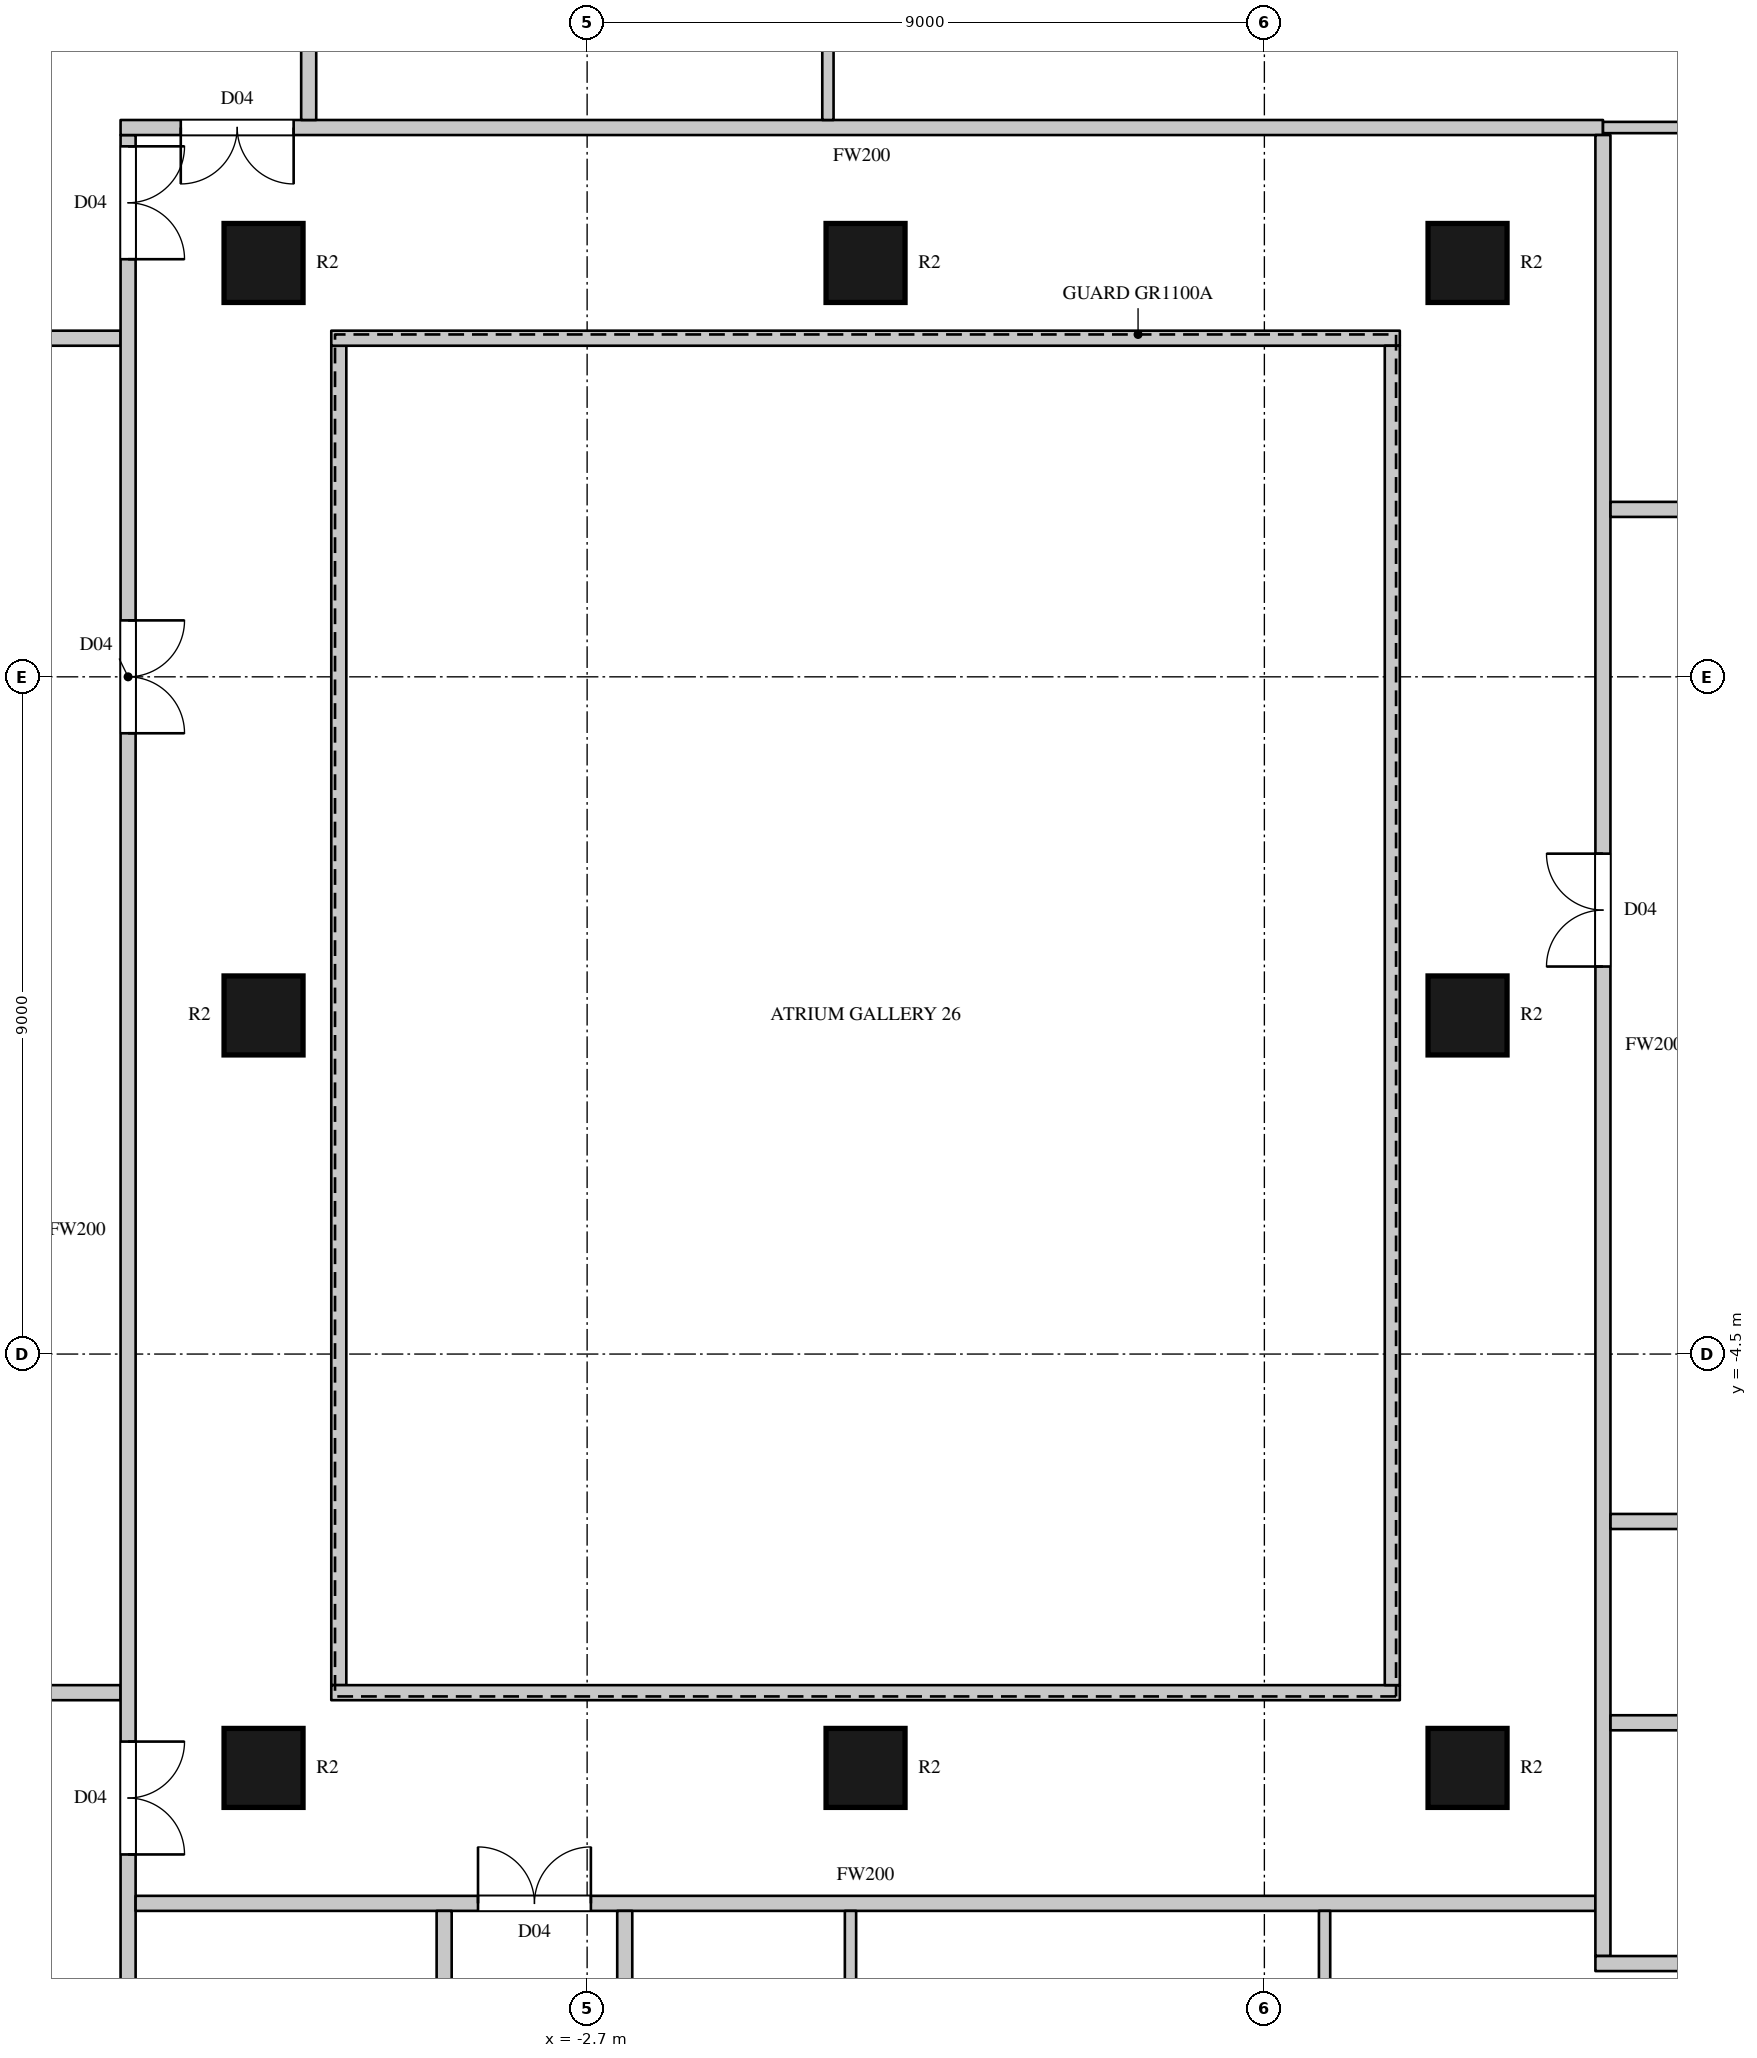
"""IFC4 building model, lengths in metres.
Left out: names, types, materials, properties, quantities, classifications, styles, units other than length and angle.
Written with IfcOpenShell. Run it as: python <this file> out.ifc"""

import sys

from ifc_helpers import new_model, si_unit, direction, frame, frame_2d, origin, origin_2d, place, context, subcontext, project, spatial, rectangle, circle, extrude, element, fill, save


model = new_model("IFC4")
c1 = context("Model", 3, precision=1e-05, world=origin(), true_north=direction((0.0, 1.0)))
c2 = subcontext(c1, "Body", "Model", "MODEL_VIEW")
j1 = project(units=[si_unit("LENGTHUNIT", "METRE"), si_unit("PLANEANGLEUNIT", "RADIAN")], contexts=[c1])
p1 = place(None, origin())
s1 = spatial("IfcSite", under=j1, at=p1, CompositionType="ELEMENT")
p2 = place(p1, origin())
s2 = spatial("IfcBuilding", under=s1, at=p2, CompositionType="ELEMENT")
p3 = place(p2, frame((0.0, 0.0, 123.9)))
s3 = spatial("IfcBuildingStorey", under=s2, at=p3, CompositionType="ELEMENT", Elevation=123.9)
for number, where, z_axis, x_axis in (
    (1, (-7.0, -10.0, 0.0), (0.0, 0.0, 1.0), (1.0, 0.0, 0.0)),
    (2, (-7.0, 0.0, 0.0), (0.0, 0.0, 1.0), (1.0, 0.0, 0.0)),
    (3, (-7.0, 10.0, 0.0), (0.0, 0.0, 1.0), (1.0, 0.0, 0.0)),
    (4, (1.0, -10.0, 0.0), (0.0, 0.0, 1.0), (1.0, 0.0, 0.0)),
    (5, (1.0, 10.0, 0.0), (0.0, 0.0, 1.0), (1.0, 0.0, 0.0)),
    (6, (9.0, -10.0, 0.0), (0.0, 0.0, 1.0), (1.0, 0.0, 0.0)),
    (7, (9.0, 0.0, 0.0), (0.0, 0.0, 1.0), (1.0, 0.0, 0.0)),
    (8, (9.0, 10.0, 0.0), (0.0, 0.0, 1.0), (1.0, 0.0, 0.0)),
):
    element("IfcColumn", number, at=place(p3, frame(where, z_axis=z_axis, x_axis=x_axis)), inside=s3, PredefinedType="COLUMN", context=c2, shape_type="SweptSolid", body=[
        extrude(circle(Radius=0.525, at=origin_2d()), origin(), (0.0, 0.0, 1.0), 3.6),
    ])
p4 = place(p3, frame((-13.97, -9.0, 0.0), z_axis=(0.0, 0.0, 1.0), x_axis=(1.0, 0.0, 0.0)))
e9 = element("IfcWall", 9, at=p4, inside=s3, PredefinedType="PARTITIONING", context=c2, shape_type="SweptSolid", body=[
    extrude(rectangle(XDim=5.07, YDim=0.2, at=frame_2d((2.535, 0.0))), origin(), (0.0, 0.0, 1.0), 3.3),
])
p5 = place(p4, frame((0.4, 0.0, 0.0)))
e10 = element("IfcOpeningElement", 10, at=p5, cuts=e9, PredefinedType="OPENING", context=c2, shape_type="SweptSolid", body=[
    extrude(rectangle(XDim=1.5, YDim=2.2, at=frame_2d((0.75, 1.1))), frame((0.0, 0.11, 0.0), z_axis=(0.0, -1.0, 0.0), x_axis=(1.0, 0.0, 0.0)), (0.0, 0.0, 1.0), 0.22),
])
p6 = place(p4, frame((2.05, 0.0, 0.0)))
e11 = element("IfcOpeningElement", 11, at=p6, cuts=e9, PredefinedType="OPENING", context=c2, shape_type="SweptSolid", body=[
    extrude(rectangle(XDim=1.5, YDim=2.2, at=frame_2d((0.75, 1.1))), frame((0.0, 0.11, 0.0), z_axis=(0.0, -1.0, 0.0), x_axis=(1.0, 0.0, 0.0)), (0.0, 0.0, 1.0), 0.22),
])
p7 = place(p3, frame((-13.97, 9.0, 0.0), z_axis=(0.0, 0.0, 1.0), x_axis=(1.0, 0.0, 0.0)))
e12 = element("IfcWall", 12, at=p7, inside=s3, PredefinedType="PARTITIONING", context=c2, shape_type="SweptSolid", body=[
    extrude(rectangle(XDim=5.07, YDim=0.2, at=frame_2d((2.535, 0.0))), origin(), (0.0, 0.0, 1.0), 3.3),
])
p8 = place(p3, frame((-8.8, -17.4, 0.0), z_axis=(0.0, 0.0, 1.0), x_axis=(0.0, 1.0, 0.0)))
e13 = element("IfcWall", 13, at=p8, inside=s3, PredefinedType="PARTITIONING", context=c2, shape_type="SweptSolid", body=[
    extrude(rectangle(XDim=29.1, YDim=0.2, at=frame_2d((14.55, 0.0))), origin(), (0.0, 0.0, 1.0), 3.3),
])
p9 = place(p8, frame((21.15, 0.0, 0.0)))
e14 = element("IfcOpeningElement", 14, at=p9, cuts=e13, PredefinedType="OPENING", context=c2, shape_type="SweptSolid", body=[
    extrude(rectangle(XDim=1.5, YDim=2.2, at=frame_2d((0.75, 1.1))), frame((0.0, 0.11, 0.0), z_axis=(0.0, -1.0, 0.0), x_axis=(1.0, 0.0, 0.0)), (0.0, 0.0, 1.0), 0.22),
])
p10 = place(p8, frame((6.25, 0.0, 0.0)))
e15 = element("IfcOpeningElement", 15, at=p10, cuts=e13, PredefinedType="OPENING", context=c2, shape_type="SweptSolid", body=[
    extrude(rectangle(XDim=1.5, YDim=2.2, at=frame_2d((0.75, 1.1))), frame((0.0, 0.11, 0.0), z_axis=(0.0, -1.0, 0.0), x_axis=(1.0, 0.0, 0.0)), (0.0, 0.0, 1.0), 0.22),
])
p11 = place(p8, frame((27.45, 0.0, 0.0)))
e16 = element("IfcOpeningElement", 16, at=p11, cuts=e13, PredefinedType="OPENING", context=c2, shape_type="SweptSolid", body=[
    extrude(rectangle(XDim=1.5, YDim=2.2, at=frame_2d((0.75, 1.1))), frame((0.0, 0.11, 0.0), z_axis=(0.0, -1.0, 0.0), x_axis=(1.0, 0.0, 0.0)), (0.0, 0.0, 1.0), 0.22),
])
p12 = place(p8, frame((0.15, 0.0, 0.0)))
e17 = element("IfcOpeningElement", 17, at=p12, cuts=e13, PredefinedType="OPENING", context=c2, shape_type="SweptSolid", body=[
    extrude(rectangle(XDim=0.9, YDim=2.2, at=frame_2d((0.45, 1.1))), frame((0.0, 0.11, 0.0), z_axis=(0.0, -1.0, 0.0), x_axis=(1.0, 0.0, 0.0)), (0.0, 0.0, 1.0), 0.22),
])
p13 = place(p3, frame((-8.7, -11.8, 0.0), z_axis=(0.0, 0.0, 1.0), x_axis=(1.0, 0.0, 0.0)))
e18 = element("IfcWall", 18, at=p13, inside=s3, PredefinedType="PARTITIONING", context=c2, shape_type="SweptSolid", body=[
    extrude(rectangle(XDim=19.4, YDim=0.2, at=frame_2d((9.7, 0.0))), origin(), (0.0, 0.0, 1.0), 3.3),
])
p14 = place(p13, frame((4.55, 0.0, 0.0)))
e19 = element("IfcOpeningElement", 19, at=p14, cuts=e18, PredefinedType="OPENING", context=c2, shape_type="SweptSolid", body=[
    extrude(rectangle(XDim=1.5, YDim=2.2, at=frame_2d((0.75, 1.1))), frame((0.0, 0.11, 0.0), z_axis=(0.0, -1.0, 0.0), x_axis=(1.0, 0.0, 0.0)), (0.0, 0.0, 1.0), 0.22),
])
p15 = place(p3, frame((-8.9, 11.8, 0.0), z_axis=(0.0, 0.0, 1.0), x_axis=(1.0, 0.0, 0.0)))
e20 = element("IfcWall", 20, at=p15, inside=s3, PredefinedType="PARTITIONING", context=c2, shape_type="SweptSolid", body=[
    extrude(rectangle(XDim=19.7, YDim=0.2, at=frame_2d((9.85, 0.0))), origin(), (0.0, 0.0, 1.0), 3.3),
])
p16 = place(p15, frame((0.8, 0.0, 0.0)))
e21 = element("IfcOpeningElement", 21, at=p16, cuts=e20, PredefinedType="OPENING", context=c2, shape_type="SweptSolid", body=[
    extrude(rectangle(XDim=1.5, YDim=2.2, at=frame_2d((0.75, 1.1))), frame((0.0, 0.11, 0.0), z_axis=(0.0, -1.0, 0.0), x_axis=(1.0, 0.0, 0.0)), (0.0, 0.0, 1.0), 0.22),
])
p17 = place(p3, frame((-6.4, 11.9, 0.0), z_axis=(0.0, 0.0, 1.0), x_axis=(0.0, 1.0, 0.0)))
e22 = element("IfcWall", 22, at=p17, inside=s3, PredefinedType="PARTITIONING", context=c2, shape_type="SweptSolid", body=[
    extrude(rectangle(XDim=5.5, YDim=0.2, at=frame_2d((2.75, 0.0))), origin(), (0.0, 0.0, 1.0), 3.3),
])
p18 = place(p17, frame((3.75, 0.0, 0.0)))
e23 = element("IfcOpeningElement", 23, at=p18, cuts=e22, PredefinedType="OPENING", context=c2, shape_type="SweptSolid", body=[
    extrude(rectangle(XDim=1.6, YDim=2.4, at=frame_2d((0.8, 1.2))), frame((0.0, 0.11, 0.0), z_axis=(0.0, -1.0, 0.0), x_axis=(1.0, 0.0, 0.0)), (0.0, 0.0, 1.0), 0.22),
])
p19 = place(p3, frame((-6.0, -8.9, 0.0), z_axis=(0.0, 0.0, 1.0), x_axis=(0.0, 1.0, 0.0)))
e24 = element("IfcWall", 24, at=p19, inside=s3, PredefinedType="PARTITIONING", context=c2, shape_type="SweptSolid", body=[
    extrude(rectangle(XDim=17.8, YDim=0.2, at=frame_2d((8.9, 0.0))), origin(), (0.0, 0.0, 1.0), 3.3),
])
for number, where, z_axis, x_axis in (
    (25, (-6.1, -9.0, 0.0), (0.0, 0.0, 1.0), (1.0, 0.0, 0.0)),
    (26, (-6.1, 9.0, 0.0), (0.0, 0.0, 1.0), (1.0, 0.0, 0.0)),
):
    element("IfcWall", number, at=place(p3, frame(where, z_axis=z_axis, x_axis=x_axis)), inside=s3, PredefinedType="PARTITIONING", context=c2, shape_type="SweptSolid", body=[
        extrude(rectangle(XDim=14.2, YDim=0.2, at=frame_2d((7.1, 0.0))), origin(), (0.0, 0.0, 1.0), 3.3),
    ])
p20 = place(p3, frame((-4.6, -17.4, 0.0), z_axis=(0.0, 0.0, 1.0), x_axis=(0.0, 1.0, 0.0)))
e27 = element("IfcWall", 27, at=p20, inside=s3, PredefinedType="PARTITIONING", context=c2, shape_type="SweptSolid", body=[
    extrude(rectangle(XDim=5.5, YDim=0.2, at=frame_2d((2.75, 0.0))), origin(), (0.0, 0.0, 1.0), 3.3),
])
p21 = place(p3, frame((-2.2, -17.178, 0.0), z_axis=(0.0, 0.0, 1.0), x_axis=(0.0, 1.0, 0.0)))
e28 = element("IfcWall", 28, at=p21, inside=s3, PredefinedType="PARTITIONING", context=c2, shape_type="SweptSolid", body=[
    extrude(rectangle(XDim=5.279, YDim=0.2, at=frame_2d((2.639, 0.0))), origin(), (0.0, 0.0, 1.0), 3.3),
])
p22 = place(p21, frame((0.35, 0.0, 0.0)))
e29 = element("IfcOpeningElement", 29, at=p22, cuts=e28, PredefinedType="OPENING", context=c2, shape_type="SweptSolid", body=[
    extrude(rectangle(XDim=0.9, YDim=2.2, at=frame_2d((0.45, 1.1))), frame((0.0, 0.11, 0.0), z_axis=(0.0, -1.0, 0.0), x_axis=(1.0, 0.0, 0.0)), (0.0, 0.0, 1.0), 0.22),
])
p23 = place(p3, frame((8.0, -8.9, 0.0), z_axis=(0.0, 0.0, 1.0), x_axis=(0.0, 1.0, 0.0)))
e30 = element("IfcWall", 30, at=p23, inside=s3, PredefinedType="PARTITIONING", context=c2, shape_type="SweptSolid", body=[
    extrude(rectangle(XDim=17.8, YDim=0.2, at=frame_2d((8.9, 0.0))), origin(), (0.0, 0.0, 1.0), 3.3),
])
p24 = place(p3, frame((10.799, -12.5, 0.0), z_axis=(0.0, 0.0, 1.0), x_axis=(0.0, 1.0, 0.0)))
e31 = element("IfcWall", 31, at=p24, inside=s3, PredefinedType="PARTITIONING", context=c2, shape_type="SweptSolid", body=[
    extrude(rectangle(XDim=24.2, YDim=0.2, at=frame_2d((12.1, 0.0))), origin(), (0.0, 0.0, 1.0), 3.3),
])
p25 = place(p24, frame((13.15, 0.0, 0.0)))
e32 = element("IfcOpeningElement", 32, at=p25, cuts=e31, PredefinedType="OPENING", context=c2, shape_type="SweptSolid", body=[
    extrude(rectangle(XDim=1.5, YDim=2.2, at=frame_2d((0.75, 1.1))), frame((0.0, 0.11, 0.0), z_axis=(0.0, -1.0, 0.0), x_axis=(1.0, 0.0, 0.0)), (0.0, 0.0, 1.0), 0.22),
])
p26 = place(p3, frame((10.699, -12.6, 0.0), z_axis=(0.0, 0.0, 1.0), x_axis=(1.0, 0.0, 0.0)))
e33 = element("IfcWall", 33, at=p26, inside=s3, PredefinedType="PARTITIONING", context=c2, shape_type="SweptSolid", body=[
    extrude(rectangle(XDim=5.501, YDim=0.2, at=frame_2d((2.75, 0.0))), origin(), (0.0, 0.0, 1.0), 3.3),
])
p27 = place(p3, frame((10.9, -9.4, 0.0), z_axis=(0.0, 0.0, 1.0), x_axis=(1.0, 0.0, 0.0)))
e34 = element("IfcWall", 34, at=p27, inside=s3, PredefinedType="PARTITIONING", context=c2, shape_type="SweptSolid", body=[
    extrude(rectangle(XDim=5.3, YDim=0.2, at=frame_2d((2.65, 0.0))), origin(), (0.0, 0.0, 1.0), 3.3),
])
p28 = place(p27, frame((4.05, 0.0, 0.0)))
e35 = element("IfcOpeningElement", 35, at=p28, cuts=e34, PredefinedType="OPENING", context=c2, shape_type="SweptSolid", body=[
    extrude(rectangle(XDim=0.95, YDim=2.2, at=frame_2d((0.475, 1.1))), frame((0.0, 0.11, 0.0), z_axis=(0.0, -1.0, 0.0), x_axis=(1.0, 0.0, 0.0)), (0.0, 0.0, 1.0), 0.22),
])
p29 = place(p3, frame((10.9, -6.725, 0.0), z_axis=(0.0, 0.0, 1.0), x_axis=(1.0, 0.0, 0.0)))
e36 = element("IfcWall", 36, at=p29, inside=s3, PredefinedType="PARTITIONING", context=c2, shape_type="SweptSolid", body=[
    extrude(rectangle(XDim=5.3, YDim=0.2, at=frame_2d((2.65, 0.0))), origin(), (0.0, 0.0, 1.0), 3.3),
])
p30 = place(p3, frame((10.9, 6.725, 0.0), z_axis=(0.0, 0.0, 1.0), x_axis=(1.0, 0.0, 0.0)))
e37 = element("IfcWall", 37, at=p30, inside=s3, PredefinedType="PARTITIONING", context=c2, shape_type="SweptSolid", body=[
    extrude(rectangle(XDim=5.3, YDim=0.2, at=frame_2d((2.65, 0.0))), origin(), (0.0, 0.0, 1.0), 3.3),
])
p31 = place(p30, frame((4.1, 0.0, 0.0)))
e38 = element("IfcOpeningElement", 38, at=p31, cuts=e37, PredefinedType="OPENING", context=c2, shape_type="SweptSolid", body=[
    extrude(rectangle(XDim=0.9, YDim=2.2, at=frame_2d((0.45, 1.1))), frame((0.0, 0.11, 0.0), z_axis=(0.0, -1.0, 0.0), x_axis=(1.0, 0.0, 0.0)), (0.0, 0.0, 1.0), 0.22),
])
for number, where, z_axis, x_axis in (
    (39, (0.5, 11.9, 0.0), (0.0, 0.0, 1.0), (0.0, 1.0, 0.0)),
    (40, (0.8, -17.4, 0.0), (0.0, 0.0, 1.0), (0.0, 1.0, 0.0)),
    (41, (7.1, -17.4, 0.0), (0.0, 0.0, 1.0), (0.0, 1.0, 0.0)),
):
    element("IfcWall", number, at=place(p3, frame(where, z_axis=z_axis, x_axis=x_axis)), inside=s3, PredefinedType="PARTITIONING", context=c2, shape_type="SweptSolid", body=[
        extrude(rectangle(XDim=5.5, YDim=0.15, at=frame_2d((2.75, 0.0))), origin(), (0.0, 0.0, 1.0), 3.3),
    ])
p32 = place(p3, frame((10.8, 11.8, 0.0), z_axis=(0.0, 0.0, 1.0), x_axis=(1.0, 0.0, 0.0)))
e42 = element("IfcWall", 42, at=p32, inside=s3, PredefinedType="PARTITIONING", context=c2, shape_type="SweptSolid", body=[
    extrude(rectangle(XDim=5.2, YDim=0.15, at=frame_2d((2.6, 0.0))), origin(), (0.0, 0.0, 1.0), 3.3),
])
p33 = place(p9, origin())
e43 = element("IfcDoor", 43, at=p33, inside=s3, OperationType="DOUBLE_DOOR_SINGLE_SWING", PredefinedType="DOOR", context=c2, shape_type="SweptSolid", body=[
    extrude(rectangle(XDim=1.5, YDim=2.2, at=frame_2d((0.75, 1.1))), frame((0.0, 0.025, 0.0), z_axis=(0.0, -1.0, 0.0), x_axis=(1.0, 0.0, 0.0)), (0.0, 0.0, 1.0), 0.05),
])
fill(e14, e43)
p34 = place(p10, origin())
e44 = element("IfcDoor", 44, at=p34, inside=s3, OperationType="DOUBLE_DOOR_SINGLE_SWING", PredefinedType="DOOR", context=c2, shape_type="SweptSolid", body=[
    extrude(rectangle(XDim=1.5, YDim=2.2, at=frame_2d((0.75, 1.1))), frame((0.0, 0.025, 0.0), z_axis=(0.0, -1.0, 0.0), x_axis=(1.0, 0.0, 0.0)), (0.0, 0.0, 1.0), 0.05),
])
fill(e15, e44)
p35 = place(p11, origin())
e45 = element("IfcDoor", 45, at=p35, inside=s3, OperationType="DOUBLE_DOOR_SINGLE_SWING", PredefinedType="DOOR", context=c2, shape_type="SweptSolid", body=[
    extrude(rectangle(XDim=1.5, YDim=2.2, at=frame_2d((0.75, 1.1))), frame((0.0, 0.025, 0.0), z_axis=(0.0, -1.0, 0.0), x_axis=(1.0, 0.0, 0.0)), (0.0, 0.0, 1.0), 0.05),
])
fill(e16, e45)
p36 = place(p14, origin())
e46 = element("IfcDoor", 46, at=p36, inside=s3, OperationType="DOUBLE_DOOR_SINGLE_SWING", PredefinedType="DOOR", context=c2, shape_type="SweptSolid", body=[
    extrude(rectangle(XDim=1.5, YDim=2.2, at=frame_2d((0.75, 1.1))), frame((0.0, 0.025, 0.0), z_axis=(0.0, -1.0, 0.0), x_axis=(1.0, 0.0, 0.0)), (0.0, 0.0, 1.0), 0.05),
])
fill(e19, e46)
p37 = place(p16, origin())
e47 = element("IfcDoor", 47, at=p37, inside=s3, OperationType="DOUBLE_DOOR_SINGLE_SWING", PredefinedType="DOOR", context=c2, shape_type="SweptSolid", body=[
    extrude(rectangle(XDim=1.5, YDim=2.2, at=frame_2d((0.75, 1.1))), frame((0.0, 0.025, 0.0), z_axis=(0.0, -1.0, 0.0), x_axis=(1.0, 0.0, 0.0)), (0.0, 0.0, 1.0), 0.05),
])
fill(e21, e47)
p38 = place(p25, origin())
e48 = element("IfcDoor", 48, at=p38, inside=s3, OperationType="DOUBLE_DOOR_SINGLE_SWING", PredefinedType="DOOR", context=c2, shape_type="SweptSolid", body=[
    extrude(rectangle(XDim=1.5, YDim=2.2, at=frame_2d((0.75, 1.1))), frame((0.0, 0.025, 0.0), z_axis=(0.0, -1.0, 0.0), x_axis=(1.0, 0.0, 0.0)), (0.0, 0.0, 1.0), 0.05),
])
fill(e32, e48)
save(model, sys.argv[1])
